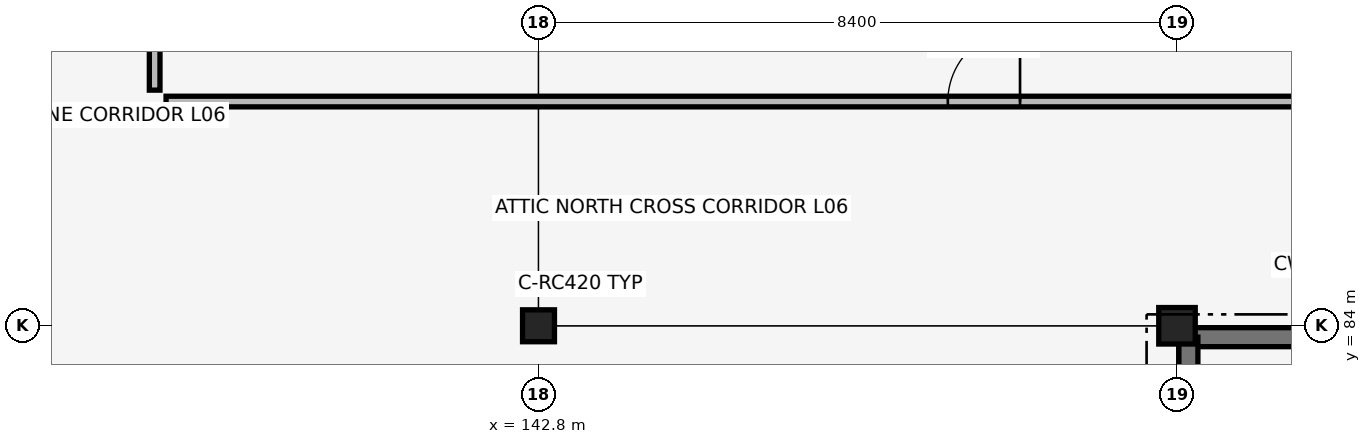
"""IFC4 building model, lengths in metres.
Left out: names, types, materials, properties, quantities, classifications, styles, units other than length and angle.
Written with IfcOpenShell. Run it as: python <this file> out.ifc"""

import sys

from ifc_helpers import new_model, si_unit, direction, frame, frame_2d, origin, origin_2d, place, context, subcontext, project, spatial, rectangle, extrude, element, fill, save


model = new_model("IFC4")
c1 = context("Model", 3, precision=1e-05, world=origin(), true_north=direction((0.0, 1.0)))
c2 = subcontext(c1, "Body", "Model", "MODEL_VIEW")
j1 = project(units=[si_unit("LENGTHUNIT", "METRE"), si_unit("PLANEANGLEUNIT", "RADIAN")], contexts=[c1])
p1 = place(None, origin())
s1 = spatial("IfcSite", under=j1, at=p1, CompositionType="ELEMENT")
p2 = place(p1, origin())
s2 = spatial("IfcBuilding", under=s1, at=p2, CompositionType="ELEMENT")
p3 = place(p2, frame((0.0, 0.0, 26.18)))
s3 = spatial("IfcBuildingStorey", under=s2, at=p3, CompositionType="ELEMENT", Elevation=26.18)
p4 = place(p3, frame((151.35, 83.85, 0.0), z_axis=(0.0, 0.0, 1.0), x_axis=(1.0, 0.0, 0.0)))
e1 = element("IfcWall", 1, at=p4, inside=s3, PredefinedType="SHEAR", context=c2, shape_type="SweptSolid", body=[
    extrude(rectangle(XDim=8.1, YDim=0.25, at=frame_2d((4.05, 0.0))), origin(), (0.0, 0.0, 1.0), 3.84),
])
p5 = place(p3, frame((151.35, 75.75, 0.0), z_axis=(0.0, 0.0, 1.0), x_axis=(0.0, 1.0, 0.0)))
e2 = element("IfcWall", 2, at=p5, inside=s3, PredefinedType="SHEAR", context=c2, shape_type="SweptSolid", body=[
    extrude(rectangle(XDim=8.1, YDim=0.25, at=frame_2d((4.05, 0.0))), origin(), (0.0, 0.0, 1.0), 3.84),
])
p6 = place(p5, frame((1.325, 0.0, 0.0)))
e3 = element("IfcOpeningElement", 3, at=p6, cuts=e2, PredefinedType="OPENING", context=c2, shape_type="SweptSolid", body=[
    extrude(rectangle(XDim=1.45, YDim=2.15, at=frame_2d((0.725, 1.075))), frame((0.0, 0.135, 0.0), z_axis=(0.0, -1.0, 0.0), x_axis=(1.0, 0.0, 0.0)), (0.0, 0.0, 1.0), 0.27),
])
p7 = place(p3, frame((142.8, 84.0, 0.0), z_axis=(0.0, 0.0, 1.0), x_axis=(1.0, 0.0, 0.0)))
e4 = element("IfcColumn", 4, at=p7, inside=s3, PredefinedType="COLUMN", context=c2, shape_type="SweptSolid", body=[
    extrude(rectangle(XDim=0.42, YDim=0.42, at=origin_2d()), origin(), (0.0, 0.0, 1.0), 3.84),
])
p8 = place(p3, frame((151.2, 84.0, 0.0), z_axis=(0.0, 0.0, 1.0), x_axis=(1.0, 0.0, 0.0)))
e5 = element("IfcColumn", 5, at=p8, inside=s3, PredefinedType="COLUMN", context=c2, shape_type="SweptSolid", body=[
    extrude(rectangle(XDim=0.48, YDim=0.48, at=origin_2d()), origin(), (0.0, 0.0, 1.0), 3.84),
])
p9 = place(p3, frame((137.9, 86.95, 0.0), z_axis=(0.0, 0.0, 1.0), x_axis=(1.0, 0.0, 0.0)))
e6 = element("IfcWall", 6, at=p9, inside=s3, PredefinedType="PARTITIONING", context=c2, shape_type="SweptSolid", body=[
    extrude(rectangle(XDim=21.52, YDim=0.14, at=frame_2d((10.76, 0.0))), origin(), (0.0, 0.0, 1.0), 3.48),
])
p10 = place(p9, frame((10.285, 0.0, 0.0)))
e7 = element("IfcOpeningElement", 7, at=p10, cuts=e6, PredefinedType="OPENING", context=c2, shape_type="SweptSolid", body=[
    extrude(rectangle(XDim=0.95, YDim=2.1, at=frame_2d((0.475, 1.05))), frame((0.0, 0.08, 0.0), z_axis=(0.0, -1.0, 0.0), x_axis=(1.0, 0.0, 0.0)), (0.0, 0.0, 1.0), 0.16),
])
p11 = place(p3, frame((137.75, 87.1, 0.0), z_axis=(0.0, 0.0, 1.0), x_axis=(0.0, 1.0, 0.0)))
e8 = element("IfcWall", 8, at=p11, inside=s3, PredefinedType="PARTITIONING", context=c2, shape_type="SweptSolid", body=[
    extrude(rectangle(XDim=13.52, YDim=0.14, at=frame_2d((6.76, 0.0))), origin(), (0.0, 0.0, 1.0), 3.84),
])
p12 = place(p10, origin())
e9 = element("IfcDoor", 9, at=p12, inside=s3, OperationType="SINGLE_SWING_RIGHT", PredefinedType="DOOR", context=c2, shape_type="SweptSolid", body=[
    extrude(rectangle(XDim=0.95, YDim=2.1, at=frame_2d((0.475, 1.05))), frame((0.0, 0.025, 0.0), z_axis=(0.0, -1.0, 0.0), x_axis=(1.0, 0.0, 0.0)), (0.0, 0.0, 1.0), 0.05),
])
fill(e7, e9)
save(model, sys.argv[1])
